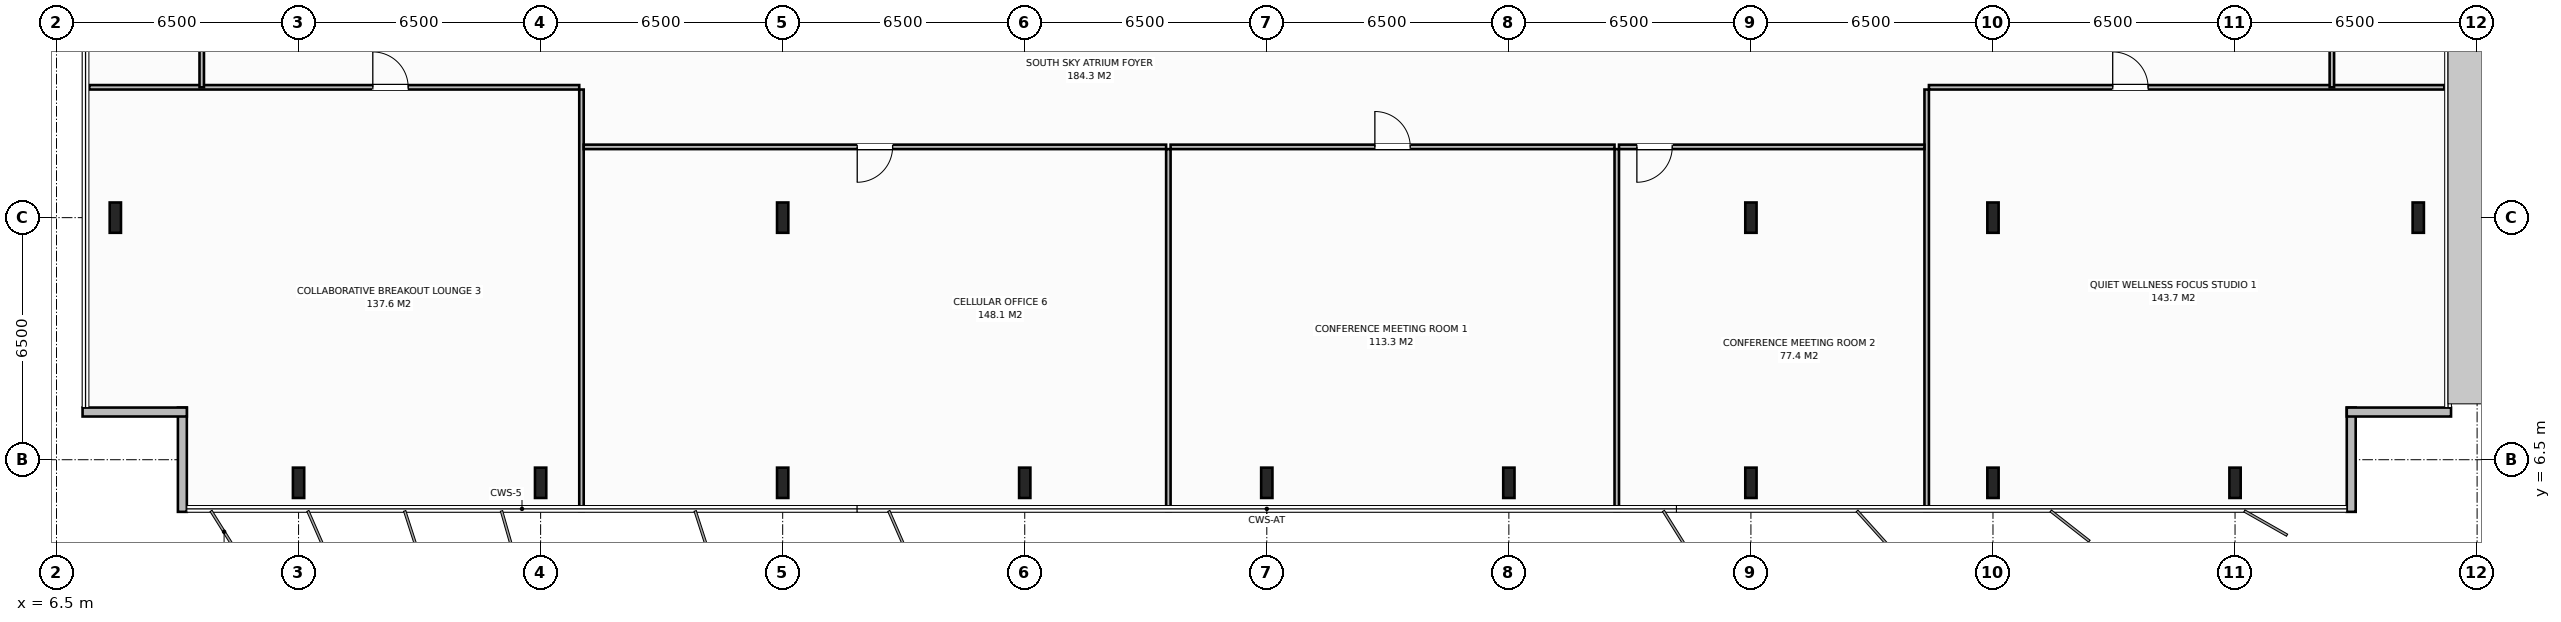
"""IFC4 building model, lengths in metres.
Left out: names, types, materials, properties, quantities, classifications, styles, units other than length and angle.
Written with IfcOpenShell. Run it as: python <this file> out.ifc"""

import sys

from ifc_helpers import new_model, si_unit, direction, frame, frame_2d, origin, origin_2d, place, context, subcontext, project, spatial, rectangle, i_section, extrude, element, fill, save


model = new_model("IFC4")
c1 = context("Model", 3, precision=1e-05, world=origin(), true_north=direction((0.0, 1.0)))
c2 = subcontext(c1, "Body", "Model", "MODEL_VIEW")
j1 = project(units=[si_unit("LENGTHUNIT", "METRE"), si_unit("PLANEANGLEUNIT", "RADIAN")], contexts=[c1])
p1 = place(None, origin())
s1 = spatial("IfcSite", under=j1, at=p1, CompositionType="ELEMENT")
p2 = place(p1, origin())
s2 = spatial("IfcBuilding", under=s1, at=p2, CompositionType="ELEMENT")
p3 = place(p2, frame((0.0, 0.0, 255.6)))
s3 = spatial("IfcBuildingStorey", under=s2, at=p3, CompositionType="ELEMENT", Elevation=255.6)
for number, where, z_axis, x_axis in (
    (1, (58.5, 13.0, 0.0), (0.0, 0.0, 1.0), (1.0, 0.0, 0.0)),
    (2, (26.0, 13.0, 0.0), (0.0, 0.0, 1.0), (1.0, 0.0, 0.0)),
    (3, (52.0, 13.0, 0.0), (0.0, 0.0, 1.0), (1.0, 0.0, 0.0)),
    (4, (13.0, 5.88, 0.0), (0.0, 0.0, 1.0), (1.0, 0.0, 0.0)),
    (5, (19.5, 5.88, 0.0), (0.0, 0.0, 1.0), (1.0, 0.0, 0.0)),
    (6, (26.0, 5.88, 0.0), (0.0, 0.0, 1.0), (1.0, 0.0, 0.0)),
    (7, (32.5, 5.88, 0.0), (0.0, 0.0, 1.0), (1.0, 0.0, 0.0)),
    (8, (39.0, 5.88, 0.0), (0.0, 0.0, 1.0), (1.0, 0.0, 0.0)),
    (9, (45.5, 5.88, 0.0), (0.0, 0.0, 1.0), (1.0, 0.0, 0.0)),
    (10, (52.0, 5.88, 0.0), (0.0, 0.0, 1.0), (1.0, 0.0, 0.0)),
    (11, (58.5, 5.88, 0.0), (0.0, 0.0, 1.0), (1.0, 0.0, 0.0)),
    (12, (65.0, 5.88, 0.0), (0.0, 0.0, 1.0), (1.0, 0.0, 0.0)),
    (13, (8.08, 13.0, 0.0), (0.0, 0.0, 1.0), (1.0, 0.0, 0.0)),
    (14, (69.92, 13.0, 0.0), (0.0, 0.0, 1.0), (1.0, 0.0, 0.0)),
):
    element("IfcColumn", number, at=place(p3, frame(where, z_axis=z_axis, x_axis=x_axis)), inside=s3, PredefinedType="COLUMN", context=c2, shape_type="SweptSolid", body=[
        extrude(i_section(OverallWidth=0.303, OverallDepth=0.814, WebThickness=0.021, FlangeThickness=0.04, at=origin_2d()), origin(), (0.0, 0.0, 1.0), 3.8),
    ])
p4 = place(p3, frame((9.88, 5.1, 0.0), z_axis=(0.0, 0.0, 1.0), x_axis=(0.0, 1.0, 0.0)))
e15 = element("IfcWall", 15, at=p4, inside=s3, PredefinedType="STANDARD", context=c2, shape_type="SweptSolid", body=[
    extrude(rectangle(XDim=2.8, YDim=0.24, at=frame_2d((1.4, 0.0))), origin(), (0.0, 0.0, 1.0), 3.588),
])
p5 = place(p3, frame((10.0, 7.78, 0.0), z_axis=(0.0, 0.0, 1.0), x_axis=(-1.0, 0.0, 0.0)))
e16 = element("IfcWall", 16, at=p5, inside=s3, PredefinedType="STANDARD", context=c2, shape_type="SweptSolid", body=[
    extrude(rectangle(XDim=2.8, YDim=0.24, at=frame_2d((1.4, 0.0))), origin(), (0.0, 0.0, 1.0), 3.588),
])
p6 = place(p3, frame((68.12, 7.9, 0.0), z_axis=(0.0, 0.0, 1.0), x_axis=(0.0, -1.0, 0.0)))
e17 = element("IfcWall", 17, at=p6, inside=s3, PredefinedType="STANDARD", context=c2, shape_type="SweptSolid", body=[
    extrude(rectangle(XDim=2.8, YDim=0.24, at=frame_2d((1.4, 0.0))), origin(), (0.0, 0.0, 1.0), 3.588),
])
p7 = place(p3, frame((70.8, 7.78, 0.0), z_axis=(0.0, 0.0, 1.0), x_axis=(-1.0, 0.0, 0.0)))
e18 = element("IfcWall", 18, at=p7, inside=s3, PredefinedType="STANDARD", context=c2, shape_type="SweptSolid", body=[
    extrude(rectangle(XDim=2.8, YDim=0.24, at=frame_2d((1.4, 0.0))), origin(), (0.0, 0.0, 1.0), 3.588),
])
p8 = place(p3, frame((20.597, 5.12, 0.0), z_axis=(0.0, 0.0, 1.0), x_axis=(0.0, 1.0, 0.0)))
e19 = element("IfcWall", 19, at=p8, inside=s3, PredefinedType="PARTITIONING", context=c2, shape_type="SweptSolid", body=[
    extrude(rectangle(XDim=11.32, YDim=0.12, at=frame_2d((5.66, 0.0))), origin(), (0.0, 0.0, 1.0), 3.588),
])
p9 = place(p3, frame((7.38, 16.5, 0.0), z_axis=(0.0, 0.0, 1.0), x_axis=(1.0, 0.0, 0.0)))
e20 = element("IfcWall", 20, at=p9, inside=s3, PredefinedType="PARTITIONING", context=c2, shape_type="SweptSolid", body=[
    extrude(rectangle(XDim=13.157, YDim=0.12, at=frame_2d((6.579, 0.0))), origin(), (0.0, 0.0, 1.0), 3.588),
])
p10 = place(p9, frame((7.614, 0.0, 0.0)))
e21 = element("IfcOpeningElement", 21, at=p10, cuts=e20, PredefinedType="OPENING", context=c2, shape_type="SweptSolid", body=[
    extrude(rectangle(XDim=0.95, YDim=2.15, at=frame_2d((0.475, 1.075))), frame((0.0, 0.07, 0.0), z_axis=(0.0, -1.0, 0.0), x_axis=(1.0, 0.0, 0.0)), (0.0, 0.0, 1.0), 0.14),
])
p11 = place(p3, frame((36.357, 5.12, 0.0), z_axis=(0.0, 0.0, 1.0), x_axis=(0.0, 1.0, 0.0)))
e22 = element("IfcWall", 22, at=p11, inside=s3, PredefinedType="PARTITIONING", context=c2, shape_type="SweptSolid", body=[
    extrude(rectangle(XDim=9.72, YDim=0.12, at=frame_2d((4.86, 0.0))), origin(), (0.0, 0.0, 1.0), 3.588),
])
p12 = place(p3, frame((20.657, 14.9, 0.0), z_axis=(0.0, 0.0, 1.0), x_axis=(1.0, 0.0, 0.0)))
e23 = element("IfcWall", 23, at=p12, inside=s3, PredefinedType="PARTITIONING", context=c2, shape_type="SweptSolid", body=[
    extrude(rectangle(XDim=15.639, YDim=0.12, at=frame_2d((7.82, 0.0))), origin(), (0.0, 0.0, 1.0), 3.588),
])
p13 = place(p12, frame((7.345, 0.0, 0.0)))
e24 = element("IfcOpeningElement", 24, at=p13, cuts=e23, PredefinedType="OPENING", context=c2, shape_type="SweptSolid", body=[
    extrude(rectangle(XDim=0.95, YDim=2.15, at=frame_2d((0.475, 1.075))), frame((0.0, 0.07, 0.0), z_axis=(0.0, -1.0, 0.0), x_axis=(1.0, 0.0, 0.0)), (0.0, 0.0, 1.0), 0.14),
])
p14 = place(p3, frame((48.397, 5.12, 0.0), z_axis=(0.0, 0.0, 1.0), x_axis=(0.0, 1.0, 0.0)))
e25 = element("IfcWall", 25, at=p14, inside=s3, PredefinedType="PARTITIONING", context=c2, shape_type="SweptSolid", body=[
    extrude(rectangle(XDim=9.72, YDim=0.12, at=frame_2d((4.86, 0.0))), origin(), (0.0, 0.0, 1.0), 3.588),
])
p15 = place(p3, frame((36.417, 14.9, 0.0), z_axis=(0.0, 0.0, 1.0), x_axis=(1.0, 0.0, 0.0)))
e26 = element("IfcWall", 26, at=p15, inside=s3, PredefinedType="PARTITIONING", context=c2, shape_type="SweptSolid", body=[
    extrude(rectangle(XDim=11.921, YDim=0.12, at=frame_2d((5.96, 0.0))), origin(), (0.0, 0.0, 1.0), 3.588),
])
p16 = place(p15, frame((5.485, 0.0, 0.0)))
e27 = element("IfcOpeningElement", 27, at=p16, cuts=e26, PredefinedType="OPENING", context=c2, shape_type="SweptSolid", body=[
    extrude(rectangle(XDim=0.95, YDim=2.15, at=frame_2d((0.475, 1.075))), frame((0.0, 0.07, 0.0), z_axis=(0.0, -1.0, 0.0), x_axis=(1.0, 0.0, 0.0)), (0.0, 0.0, 1.0), 0.14),
])
p17 = place(p3, frame((56.72, 5.12, 0.0), z_axis=(0.0, 0.0, 1.0), x_axis=(0.0, 1.0, 0.0)))
e28 = element("IfcWall", 28, at=p17, inside=s3, PredefinedType="PARTITIONING", context=c2, shape_type="SweptSolid", body=[
    extrude(rectangle(XDim=11.32, YDim=0.12, at=frame_2d((5.66, 0.0))), origin(), (0.0, 0.0, 1.0), 3.588),
])
p18 = place(p3, frame((48.458, 14.9, 0.0), z_axis=(0.0, 0.0, 1.0), x_axis=(1.0, 0.0, 0.0)))
e29 = element("IfcWall", 29, at=p18, inside=s3, PredefinedType="PARTITIONING", context=c2, shape_type="SweptSolid", body=[
    extrude(rectangle(XDim=8.202, YDim=0.12, at=frame_2d((4.101, 0.0))), origin(), (0.0, 0.0, 1.0), 3.588),
])
p19 = place(p18, frame((0.48, 0.0, 0.0)))
e30 = element("IfcOpeningElement", 30, at=p19, cuts=e29, PredefinedType="OPENING", context=c2, shape_type="SweptSolid", body=[
    extrude(rectangle(XDim=0.95, YDim=2.15, at=frame_2d((0.475, 1.075))), frame((0.0, 0.07, 0.0), z_axis=(0.0, -1.0, 0.0), x_axis=(1.0, 0.0, 0.0)), (0.0, 0.0, 1.0), 0.14),
])
p20 = place(p3, frame((56.78, 16.5, 0.0), z_axis=(0.0, 0.0, 1.0), x_axis=(1.0, 0.0, 0.0)))
e31 = element("IfcWall", 31, at=p20, inside=s3, PredefinedType="PARTITIONING", context=c2, shape_type="SweptSolid", body=[
    extrude(rectangle(XDim=13.84, YDim=0.12, at=frame_2d((6.92, 0.0))), origin(), (0.0, 0.0, 1.0), 3.588),
])
p21 = place(p20, frame((4.935, 0.0, 0.0)))
e32 = element("IfcOpeningElement", 32, at=p21, cuts=e31, PredefinedType="OPENING", context=c2, shape_type="SweptSolid", body=[
    extrude(rectangle(XDim=0.95, YDim=2.15, at=frame_2d((0.475, 1.075))), frame((0.0, 0.07, 0.0), z_axis=(0.0, -1.0, 0.0), x_axis=(1.0, 0.0, 0.0)), (0.0, 0.0, 1.0), 0.14),
])
p22 = place(p3, frame((10.4, 16.5, 0.0), z_axis=(0.0, 0.0, 1.0), x_axis=(0.0, 1.0, 0.0)))
e33 = element("IfcWall", 33, at=p22, inside=s3, PredefinedType="PARTITIONING", context=c2, shape_type="SweptSolid", body=[
    extrude(rectangle(XDim=6.333, YDim=0.12, at=frame_2d((3.167, 0.0))), origin(), (0.0, 0.0, 1.0), 3.588),
])
p23 = place(p22, frame((3.742, 0.0, 0.0)))
e34 = element("IfcOpeningElement", 34, at=p23, cuts=e33, PredefinedType="OPENING", context=c2, shape_type="SweptSolid", body=[
    extrude(rectangle(XDim=0.95, YDim=2.15, at=frame_2d((0.475, 1.075))), frame((0.0, 0.07, 0.0), z_axis=(0.0, -1.0, 0.0), x_axis=(1.0, 0.0, 0.0)), (0.0, 0.0, 1.0), 0.14),
])
p24 = place(p3, frame((67.6, 16.5, 0.0), z_axis=(0.0, 0.0, 1.0), x_axis=(0.0, 1.0, 0.0)))
e35 = element("IfcWall", 35, at=p24, inside=s3, PredefinedType="PARTITIONING", context=c2, shape_type="SweptSolid", body=[
    extrude(rectangle(XDim=19.0, YDim=0.12, at=frame_2d((9.5, 0.0))), origin(), (0.0, 0.0, 1.0), 3.588),
])
p25 = place(p24, frame((9.025, 0.0, 0.0)))
e36 = element("IfcOpeningElement", 36, at=p25, cuts=e35, PredefinedType="OPENING", context=c2, shape_type="SweptSolid", body=[
    extrude(rectangle(XDim=0.95, YDim=2.15, at=frame_2d((0.475, 1.075))), frame((0.0, 0.07, 0.0), z_axis=(0.0, -1.0, 0.0), x_axis=(1.0, 0.0, 0.0)), (0.0, 0.0, 1.0), 0.14),
])
p26 = place(p10, origin())
e37 = element("IfcDoor", 37, at=p26, inside=s3, OperationType="SINGLE_SWING_LEFT", PredefinedType="DOOR", context=c2, shape_type="SweptSolid", body=[
    extrude(rectangle(XDim=0.95, YDim=2.15, at=frame_2d((0.475, 1.075))), frame((0.0, 0.025, 0.0), z_axis=(0.0, -1.0, 0.0), x_axis=(1.0, 0.0, 0.0)), (0.0, 0.0, 1.0), 0.05),
])
fill(e21, e37)
p27 = place(p13, origin())
e38 = element("IfcDoor", 38, at=p27, inside=s3, OperationType="SINGLE_SWING_RIGHT", PredefinedType="DOOR", context=c2, shape_type="SweptSolid", body=[
    extrude(rectangle(XDim=0.95, YDim=2.15, at=frame_2d((0.475, 1.075))), frame((0.0, 0.025, 0.0), z_axis=(0.0, -1.0, 0.0), x_axis=(1.0, 0.0, 0.0)), (0.0, 0.0, 1.0), 0.05),
])
fill(e24, e38)
p28 = place(p16, origin())
e39 = element("IfcDoor", 39, at=p28, inside=s3, OperationType="SINGLE_SWING_LEFT", PredefinedType="DOOR", context=c2, shape_type="SweptSolid", body=[
    extrude(rectangle(XDim=0.95, YDim=2.15, at=frame_2d((0.475, 1.075))), frame((0.0, 0.025, 0.0), z_axis=(0.0, -1.0, 0.0), x_axis=(1.0, 0.0, 0.0)), (0.0, 0.0, 1.0), 0.05),
])
fill(e27, e39)
p29 = place(p19, origin())
e40 = element("IfcDoor", 40, at=p29, inside=s3, OperationType="SINGLE_SWING_RIGHT", PredefinedType="DOOR", context=c2, shape_type="SweptSolid", body=[
    extrude(rectangle(XDim=0.95, YDim=2.15, at=frame_2d((0.475, 1.075))), frame((0.0, 0.025, 0.0), z_axis=(0.0, -1.0, 0.0), x_axis=(1.0, 0.0, 0.0)), (0.0, 0.0, 1.0), 0.05),
])
fill(e30, e40)
p30 = place(p21, origin())
e41 = element("IfcDoor", 41, at=p30, inside=s3, OperationType="SINGLE_SWING_LEFT", PredefinedType="DOOR", context=c2, shape_type="SweptSolid", body=[
    extrude(rectangle(XDim=0.95, YDim=2.15, at=frame_2d((0.475, 1.075))), frame((0.0, 0.025, 0.0), z_axis=(0.0, -1.0, 0.0), x_axis=(1.0, 0.0, 0.0)), (0.0, 0.0, 1.0), 0.05),
])
fill(e32, e41)
save(model, sys.argv[1])
